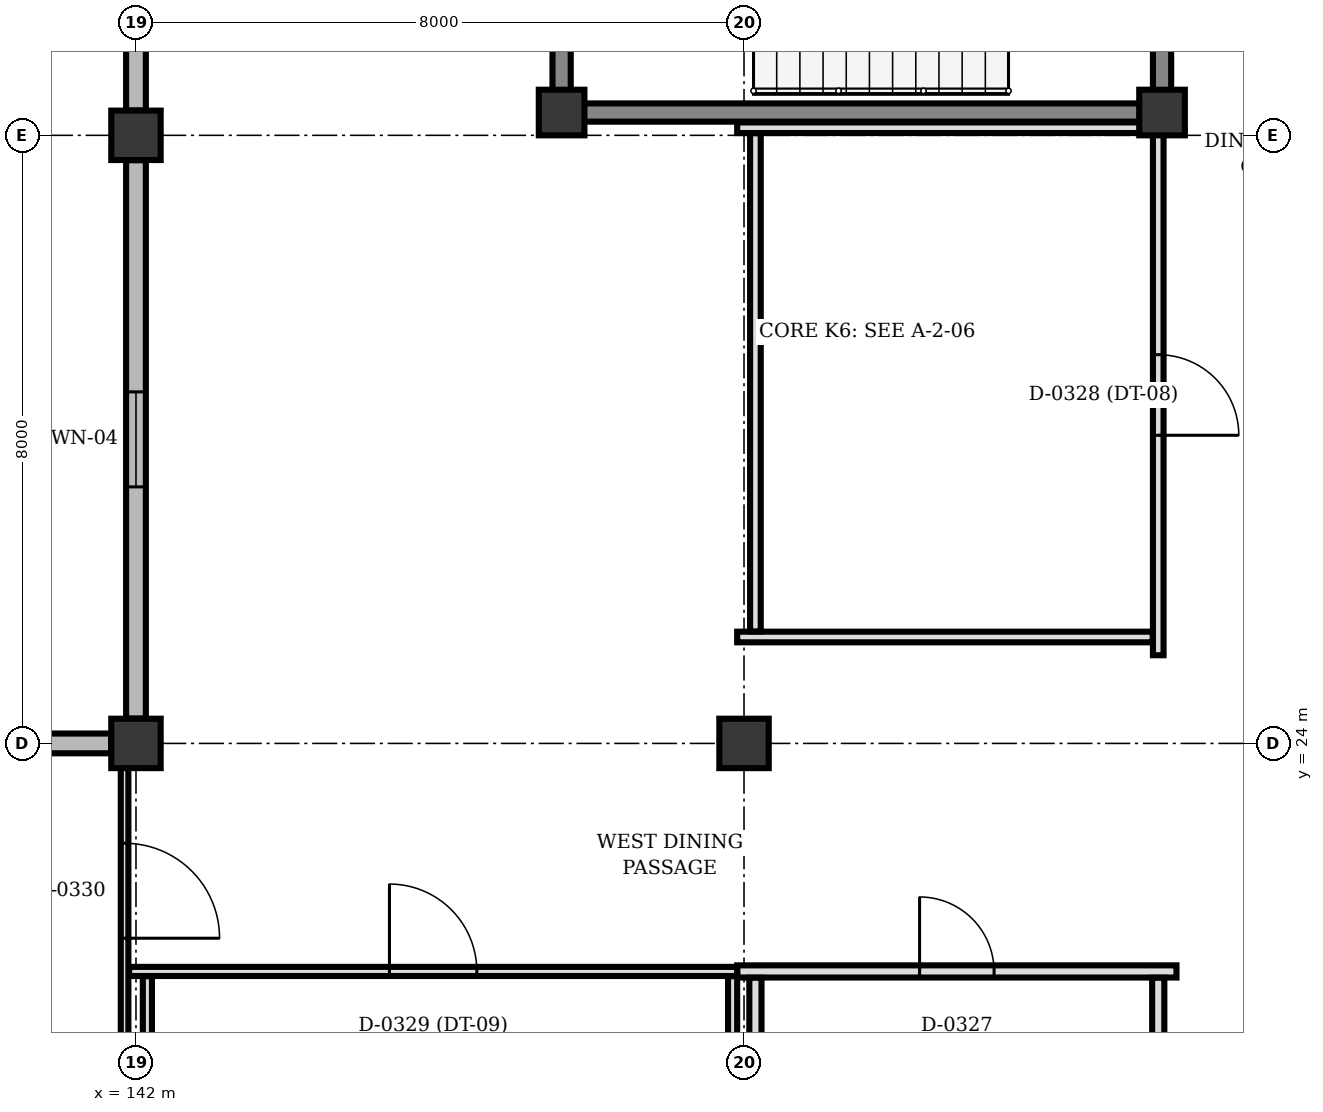
"""IFC4 building model, lengths in metres.
Left out: names, types, materials, properties, quantities, classifications, styles, units other than length and angle.
Written with IfcOpenShell. Run it as: python <this file> out.ifc"""

import sys

from ifc_helpers import new_model, si_unit, direction, frame, frame_2d, origin, origin_2d, place, context, subcontext, project, spatial, rectangle, extrude, element, fill, save


model = new_model("IFC4")
c1 = context("Model", 3, precision=1e-05, world=origin(), true_north=direction((0.0, 1.0)))
c2 = subcontext(c1, "Body", "Model", "MODEL_VIEW")
j1 = project(units=[si_unit("LENGTHUNIT", "METRE"), si_unit("PLANEANGLEUNIT", "RADIAN")], contexts=[c1])
p1 = place(None, origin())
s1 = spatial("IfcSite", under=j1, at=p1, CompositionType="ELEMENT")
p2 = place(p1, origin())
s2 = spatial("IfcBuilding", under=s1, at=p2, CompositionType="ELEMENT")
p3 = place(p2, origin())
s3 = spatial("IfcBuildingStorey", under=s2, at=p3, CompositionType="ELEMENT", Elevation=0.0)
for number, where, z_axis, x_axis in (
    (1, (147.6, 32.3, 0.0), (0.0, 0.0, 1.0), (1.0, 0.0, 0.0)),
    (2, (155.5, 32.3, 0.0), (0.0, 0.0, 1.0), (1.0, 0.0, 0.0)),
):
    element("IfcColumn", number, at=place(p3, frame(where, z_axis=z_axis, x_axis=x_axis)), inside=s3, PredefinedType="COLUMN", context=c2, shape_type="SweptSolid", body=[
        extrude(rectangle(XDim=0.6, YDim=0.6, at=origin_2d()), origin(), (0.0, 0.0, 1.0), 4.5),
    ])
for number, where, z_axis, x_axis in (
    (3, (142.0, 24.0, 0.0), (0.0, 0.0, 1.0), (1.0, 0.0, 0.0)),
    (4, (142.0, 32.0, 0.0), (0.0, 0.0, 1.0), (1.0, 0.0, 0.0)),
    (5, (150.0, 24.0, 0.0), (0.0, 0.0, 1.0), (1.0, 0.0, 0.0)),
):
    element("IfcColumn", number, at=place(p3, frame(where, z_axis=z_axis, x_axis=x_axis)), inside=s3, PredefinedType="COLUMN", context=c2, shape_type="SweptSolid", body=[
        extrude(rectangle(XDim=0.65, YDim=0.65, at=origin_2d()), origin(), (0.0, 0.0, 1.0), 4.5),
    ])
p4 = place(p3, frame((134.327, 24.0, 0.0), z_axis=(0.0, 0.0, 1.0), x_axis=(1.0, 0.0, 0.0)))
e6 = element("IfcWall", 6, at=p4, inside=s3, PredefinedType="SOLIDWALL", context=c2, shape_type="SweptSolid", body=[
    extrude(rectangle(XDim=7.346, YDim=0.26, at=frame_2d((3.673, 0.0))), origin(), (0.0, 0.0, 1.0), 3.55),
])
p5 = place(p4, frame((3.048, 0.0, 0.9)))
e7 = element("IfcOpeningElement", 7, at=p5, cuts=e6, PredefinedType="OPENING", context=c2, shape_type="SweptSolid", body=[
    extrude(rectangle(XDim=1.25, YDim=1.1, at=frame_2d((0.625, 0.55))), frame((0.0, 0.14, 0.0), z_axis=(0.0, -1.0, 0.0), x_axis=(1.0, 0.0, 0.0)), (0.0, 0.0, 1.0), 0.28),
])
p6 = place(p3, frame((142.0, 24.327, 0.0), z_axis=(0.0, 0.0, 1.0), x_axis=(0.0, 1.0, 0.0)))
e8 = element("IfcWall", 8, at=p6, inside=s3, PredefinedType="SOLIDWALL", context=c2, shape_type="SweptSolid", body=[
    extrude(rectangle(XDim=7.346, YDim=0.26, at=frame_2d((3.673, 0.0))), origin(), (0.0, 0.0, 1.0), 3.55),
])
p7 = place(p6, frame((3.048, 0.0, 0.9)))
e9 = element("IfcOpeningElement", 9, at=p7, cuts=e8, PredefinedType="OPENING", context=c2, shape_type="SweptSolid", body=[
    extrude(rectangle(XDim=1.25, YDim=1.1, at=frame_2d((0.625, 0.55))), frame((0.0, 0.14, 0.0), z_axis=(0.0, -1.0, 0.0), x_axis=(1.0, 0.0, 0.0)), (0.0, 0.0, 1.0), 0.28),
])
p8 = place(p3, frame((142.0, 32.327, 0.0), z_axis=(0.0, 0.0, 1.0), x_axis=(0.0, 1.0, 0.0)))
e10 = element("IfcWall", 10, at=p8, inside=s3, PredefinedType="SOLIDWALL", context=c2, shape_type="SweptSolid", body=[
    extrude(rectangle(XDim=7.346, YDim=0.26, at=frame_2d((3.673, 0.0))), origin(), (0.0, 0.0, 1.0), 3.55),
])
p9 = place(p3, frame((147.6, 32.592, 0.0), z_axis=(0.0, 0.0, 1.0), x_axis=(0.0, 1.0, 0.0)))
e11 = element("IfcWall", 11, at=p9, inside=s3, PredefinedType="SHEAR", context=c2, shape_type="SweptSolid", body=[
    extrude(rectangle(XDim=4.608, YDim=0.24, at=frame_2d((2.304, 0.0))), origin(), (0.0, 0.0, 1.0), 4.24),
])
p10 = place(p3, frame((155.5, 36.908, 0.0), z_axis=(0.0, 0.0, 1.0), x_axis=(0.0, -1.0, 0.0)))
e12 = element("IfcWall", 12, at=p10, inside=s3, PredefinedType="SHEAR", context=c2, shape_type="SweptSolid", body=[
    extrude(rectangle(XDim=4.316, YDim=0.24, at=frame_2d((2.158, 0.0))), origin(), (0.0, 0.0, 1.0), 4.24),
])
p11 = place(p10, frame((1.718, 0.0, 0.0)))
e13 = element("IfcOpeningElement", 13, at=p11, cuts=e12, PredefinedType="OPENING", context=c2, shape_type="SweptSolid", body=[
    extrude(rectangle(XDim=0.88, YDim=2.1, at=frame_2d((0.44, 1.05))), frame((0.0, 0.13, 0.0), z_axis=(0.0, -1.0, 0.0), x_axis=(1.0, 0.0, 0.0)), (0.0, 0.0, 1.0), 0.26),
])
p12 = place(p3, frame((155.208, 32.3, 0.0), z_axis=(0.0, 0.0, 1.0), x_axis=(-1.0, 0.0, 0.0)))
e14 = element("IfcWall", 14, at=p12, inside=s3, PredefinedType="SHEAR", context=c2, shape_type="SweptSolid", body=[
    extrude(rectangle(XDim=7.316, YDim=0.24, at=frame_2d((3.658, 0.0))), origin(), (0.0, 0.0, 1.0), 4.24),
])
p13 = place(p3, frame((149.91, 21.0, 0.0), z_axis=(0.0, 0.0, 1.0), x_axis=(1.0, 0.0, 0.0)))
e15 = element("IfcWall", 15, at=p13, inside=s3, PredefinedType="PARTITIONING", context=c2, shape_type="SweptSolid", body=[
    extrude(rectangle(XDim=5.78, YDim=0.16, at=frame_2d((2.89, 0.0))), origin(), (0.0, 0.0, 1.0), 3.572),
])
p14 = place(p13, frame((2.4, 0.0, 0.0)))
e16 = element("IfcOpeningElement", 16, at=p14, cuts=e15, PredefinedType="OPENING", context=c2, shape_type="SweptSolid", body=[
    extrude(rectangle(XDim=0.98, YDim=2.2, at=frame_2d((0.49, 1.1))), frame((0.0, 0.09, 0.0), z_axis=(0.0, -1.0, 0.0), x_axis=(1.0, 0.0, 0.0)), (0.0, 0.0, 1.0), 0.18),
])
p15 = place(p3, frame((155.45, 20.917, 0.0), z_axis=(0.0, 0.0, 1.0), x_axis=(0.0, -1.0, 0.0)))
e17 = element("IfcWall", 17, at=p15, inside=s3, PredefinedType="PARTITIONING", context=c2, shape_type="SweptSolid", body=[
    extrude(rectangle(XDim=18.774, YDim=0.16, at=frame_2d((9.387, 0.0))), origin(), (0.0, 0.0, 1.0), 3.572),
])
p16 = place(p3, frame((150.15, 16.317, 0.0), z_axis=(0.0, 0.0, 1.0), x_axis=(0.0, 1.0, 0.0)))
e18 = element("IfcWall", 18, at=p16, inside=s3, PredefinedType="PARTITIONING", context=c2, shape_type="SweptSolid", body=[
    extrude(rectangle(XDim=4.6, YDim=0.16, at=frame_2d((2.3, 0.0))), origin(), (0.0, 0.0, 1.0), 3.572),
])
p17 = place(p3, frame((149.91, 32.1, 0.0), z_axis=(0.0, 0.0, 1.0), x_axis=(1.0, 0.0, 0.0)))
e19 = element("IfcWall", 19, at=p17, inside=s3, PredefinedType="PARTITIONING", context=c2, shape_type="SweptSolid", body=[
    extrude(rectangle(XDim=5.298, YDim=0.14, at=frame_2d((2.649, 0.0))), origin(), (0.0, 0.0, 1.0), 4.2),
])
p18 = place(p3, frame((155.45, 32.008, 0.0), z_axis=(0.0, 0.0, 1.0), x_axis=(0.0, -1.0, 0.0)))
e20 = element("IfcWall", 20, at=p18, inside=s3, PredefinedType="PARTITIONING", context=c2, shape_type="SweptSolid", body=[
    extrude(rectangle(XDim=6.848, YDim=0.14, at=frame_2d((3.424, 0.0))), origin(), (0.0, 0.0, 1.0), 4.2),
])
p19 = place(p18, frame((2.894, 0.0, 0.0)))
e21 = element("IfcOpeningElement", 21, at=p19, cuts=e20, PredefinedType="OPENING", context=c2, shape_type="SweptSolid", body=[
    extrude(rectangle(XDim=1.06, YDim=2.2, at=frame_2d((0.53, 1.1))), frame((0.0, 0.08, 0.0), z_axis=(0.0, -1.0, 0.0), x_axis=(1.0, 0.0, 0.0)), (0.0, 0.0, 1.0), 0.16),
])
p20 = place(p3, frame((155.377, 25.4, 0.0), z_axis=(0.0, 0.0, 1.0), x_axis=(-1.0, 0.0, 0.0)))
e22 = element("IfcWall", 22, at=p20, inside=s3, PredefinedType="PARTITIONING", context=c2, shape_type="SweptSolid", body=[
    extrude(rectangle(XDim=5.467, YDim=0.14, at=frame_2d((2.733, 0.0))), origin(), (0.0, 0.0, 1.0), 4.2),
])
p21 = place(p3, frame((150.15, 25.473, 0.0), z_axis=(0.0, 0.0, 1.0), x_axis=(0.0, 1.0, 0.0)))
e23 = element("IfcWall", 23, at=p21, inside=s3, PredefinedType="PARTITIONING", context=c2, shape_type="SweptSolid", body=[
    extrude(rectangle(XDim=6.554, YDim=0.14, at=frame_2d((3.277, 0.0))), origin(), (0.0, 0.0, 1.0), 4.2),
])
p22 = place(p3, frame((141.91, 21.0, 0.0), z_axis=(0.0, 0.0, 1.0), x_axis=(1.0, 0.0, 0.0)))
e24 = element("IfcWall", 24, at=p22, inside=s3, PredefinedType="PARTITIONING", context=c2, shape_type="SweptSolid", body=[
    extrude(rectangle(XDim=8.0, YDim=0.12, at=frame_2d((4.0, 0.0))), origin(), (0.0, 0.0, 1.0), 3.572),
])
p23 = place(p22, frame((3.425, 0.0, 0.0)))
e25 = element("IfcOpeningElement", 25, at=p23, cuts=e24, PredefinedType="OPENING", context=c2, shape_type="SweptSolid", body=[
    extrude(rectangle(XDim=1.15, YDim=2.2, at=frame_2d((0.575, 1.1))), frame((0.0, 0.07, 0.0), z_axis=(0.0, -1.0, 0.0), x_axis=(1.0, 0.0, 0.0)), (0.0, 0.0, 1.0), 0.14),
])
for number, where, z_axis, x_axis in (
    (26, (149.85, 20.937, 0.0), (0.0, 0.0, 1.0), (0.0, -1.0, 0.0)),
    (27, (142.15, 16.317, 0.0), (0.0, 0.0, 1.0), (0.0, 1.0, 0.0)),
):
    element("IfcWall", number, at=place(p3, frame(where, z_axis=z_axis, x_axis=x_axis)), inside=s3, PredefinedType="PARTITIONING", context=c2, shape_type="SweptSolid", body=[
        extrude(rectangle(XDim=4.62, YDim=0.12, at=frame_2d((2.31, 0.0))), origin(), (0.0, 0.0, 1.0), 3.572),
    ])
p24 = place(p3, frame((141.85, 23.683, 0.0), z_axis=(0.0, 0.0, 1.0), x_axis=(0.0, -1.0, 0.0)))
e28 = element("IfcWall", 28, at=p24, inside=s3, PredefinedType="PARTITIONING", context=c2, shape_type="SweptSolid", body=[
    extrude(rectangle(XDim=7.366, YDim=0.1, at=frame_2d((3.683, 0.0))), origin(), (0.0, 0.0, 1.0), 3.572),
])
p25 = place(p24, frame((0.996, 0.0, 0.0)))
e29 = element("IfcOpeningElement", 29, at=p25, cuts=e28, PredefinedType="OPENING", context=c2, shape_type="SweptSolid", body=[
    extrude(rectangle(XDim=1.25, YDim=2.2, at=frame_2d((0.625, 1.1))), frame((0.0, 0.06, 0.0), z_axis=(0.0, -1.0, 0.0), x_axis=(1.0, 0.0, 0.0)), (0.0, 0.0, 1.0), 0.12),
])
p26 = place(p7, origin())
e30 = element("IfcWindow", 30, at=p26, inside=s3, PartitioningType="SINGLE_PANEL", PredefinedType="WINDOW", context=c2, shape_type="SweptSolid", body=[
    extrude(rectangle(XDim=1.25, YDim=1.1, at=frame_2d((0.625, 0.55))), frame((0.0, 0.03, 0.0), z_axis=(0.0, -1.0, 0.0), x_axis=(1.0, 0.0, 0.0)), (0.0, 0.0, 1.0), 0.06),
])
fill(e9, e30)
p27 = place(p14, origin())
e31 = element("IfcDoor", 31, at=p27, inside=s3, OperationType="SINGLE_SWING_LEFT", PredefinedType="DOOR", context=c2, shape_type="SweptSolid", body=[
    extrude(rectangle(XDim=0.98, YDim=2.2, at=frame_2d((0.49, 1.1))), frame((0.0, 0.025, 0.0), z_axis=(0.0, -1.0, 0.0), x_axis=(1.0, 0.0, 0.0)), (0.0, 0.0, 1.0), 0.05),
])
fill(e16, e31)
p28 = place(p19, origin())
e32 = element("IfcDoor", 32, at=p28, inside=s3, OperationType="SINGLE_SWING_RIGHT", PredefinedType="DOOR", context=c2, shape_type="SweptSolid", body=[
    extrude(rectangle(XDim=1.06, YDim=2.2, at=frame_2d((0.53, 1.1))), frame((0.0, 0.025, 0.0), z_axis=(0.0, -1.0, 0.0), x_axis=(1.0, 0.0, 0.0)), (0.0, 0.0, 1.0), 0.05),
])
fill(e21, e32)
p29 = place(p23, origin())
e33 = element("IfcDoor", 33, at=p29, inside=s3, OperationType="SINGLE_SWING_LEFT", PredefinedType="DOOR", context=c2, shape_type="SweptSolid", body=[
    extrude(rectangle(XDim=1.15, YDim=2.2, at=frame_2d((0.575, 1.1))), frame((0.0, 0.025, 0.0), z_axis=(0.0, -1.0, 0.0), x_axis=(1.0, 0.0, 0.0)), (0.0, 0.0, 1.0), 0.05),
])
fill(e25, e33)
p30 = place(p25, origin())
e34 = element("IfcDoor", 34, at=p30, inside=s3, OperationType="SINGLE_SWING_RIGHT", PredefinedType="DOOR", context=c2, shape_type="SweptSolid", body=[
    extrude(rectangle(XDim=1.25, YDim=2.2, at=frame_2d((0.625, 1.1))), frame((0.0, 0.025, 0.0), z_axis=(0.0, -1.0, 0.0), x_axis=(1.0, 0.0, 0.0)), (0.0, 0.0, 1.0), 0.05),
])
fill(e29, e34)
save(model, sys.argv[1])
